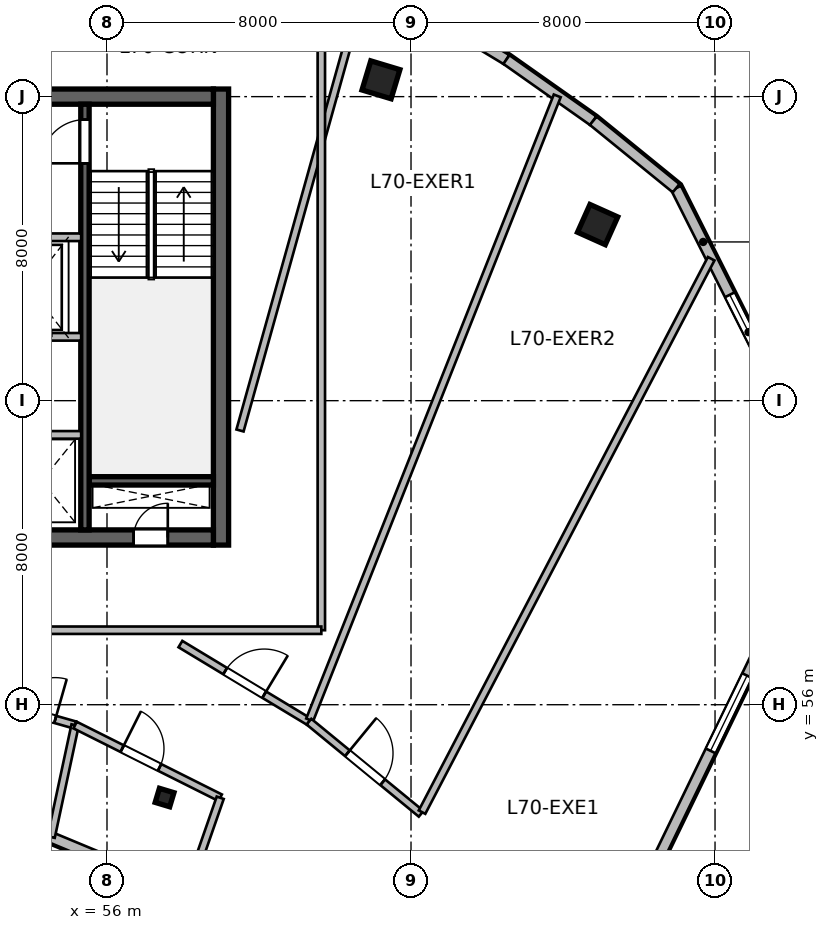
"""IFC4 building model, lengths in metres.
Left out: names, types, materials, properties, quantities, classifications, styles, units other than length and angle.
Written with IfcOpenShell. Run it as: python <this file> out.ifc"""

import sys

from ifc_helpers import new_model, si_unit, direction, frame, frame_2d, origin, origin_2d, place, context, subcontext, project, spatial, rectangle, i_section, extrude, source, transform, mapped, element, fill, save


model = new_model("IFC4")
c1 = context("Model", 3, precision=1e-05, world=origin(), true_north=direction((0.0, 1.0)))
c2 = subcontext(c1, "Body", "Model", "MODEL_VIEW")
j1 = project(units=[si_unit("LENGTHUNIT", "METRE"), si_unit("PLANEANGLEUNIT", "RADIAN")], contexts=[c1])
p1 = place(None, origin())
s1 = spatial("IfcSite", under=j1, at=p1, CompositionType="ELEMENT")
p2 = place(p1, origin())
s2 = spatial("IfcBuilding", under=s1, at=p2, CompositionType="ELEMENT")
p3 = place(p2, frame((0.0, 0.0, 287.4)))
s3 = spatial("IfcBuildingStorey", under=s2, at=p3, CompositionType="ELEMENT", Elevation=287.4)
m1 = source(origin(), c2, "Body", "SweptSolid", [
    extrude(rectangle(XDim=12.0, YDim=0.4, at=frame_2d((6.0, 0.0))), origin(), (0.0, 0.0, 1.0), 3.9),
])
p4 = place(p3, frame((59.0, 60.2, 0.0), z_axis=(0.0, 0.0, 1.0), x_axis=(0.0, 1.0, 0.0)))
e1 = element("IfcWall", 1, at=p4, inside=s3, PredefinedType="SHEAR", context=c2, shape_type="MappedRepresentation", body=[
    mapped(m1, transform((0.0, 0.0, 0.0), scale=1.0)),
])
m2 = source(origin(), c2, "Body", "SweptSolid", [
    extrude(rectangle(XDim=21.6, YDim=0.4, at=frame_2d((10.8, 0.0))), origin(), (0.0, 0.0, 1.0), 3.9),
])
p5 = place(p3, frame((37.2, 60.4, 0.0), z_axis=(0.0, 0.0, 1.0), x_axis=(1.0, 0.0, 0.0)))
e2 = element("IfcWall", 2, at=p5, inside=s3, PredefinedType="SHEAR", context=c2, shape_type="MappedRepresentation", body=[
    mapped(m2, transform((0.0, 0.0, 0.0), scale=1.0)),
])
p6 = place(p5, frame((1.1, 0.0, 0.0)))
e3 = element("IfcOpeningElement", 3, at=p6, cuts=e2, PredefinedType="OPENING", context=c2, shape_type="SweptSolid", body=[
    extrude(rectangle(XDim=1.15, YDim=2.15, at=frame_2d((0.575, 1.075))), frame((0.0, 0.21, 0.0), z_axis=(0.0, -1.0, 0.0), x_axis=(1.0, 0.0, 0.0)), (0.0, 0.0, 1.0), 0.42),
])
p7 = place(p5, frame((19.5, 0.0, 0.0)))
e4 = element("IfcOpeningElement", 4, at=p7, cuts=e2, PredefinedType="OPENING", context=c2, shape_type="SweptSolid", body=[
    extrude(rectangle(XDim=0.9, YDim=2.1, at=frame_2d((0.45, 1.05))), frame((0.0, 0.21, 0.0), z_axis=(0.0, -1.0, 0.0), x_axis=(1.0, 0.0, 0.0)), (0.0, 0.0, 1.0), 0.42),
])
p8 = place(p5, frame((12.02, 0.0, 0.0)))
e5 = element("IfcOpeningElement", 5, at=p8, cuts=e2, PredefinedType="OPENING", context=c2, shape_type="SweptSolid", body=[
    extrude(rectangle(XDim=1.6, YDim=2.15, at=frame_2d((0.8, 1.075))), frame((0.0, 0.21, 0.0), z_axis=(0.0, -1.0, 0.0), x_axis=(1.0, 0.0, 0.0)), (0.0, 0.0, 1.0), 0.42),
])
p9 = place(p3, frame((37.2, 72.0, 0.0), z_axis=(0.0, 0.0, 1.0), x_axis=(1.0, 0.0, 0.0)))
e6 = element("IfcWall", 6, at=p9, inside=s3, PredefinedType="SHEAR", context=c2, shape_type="MappedRepresentation", body=[
    mapped(m2, transform((0.0, 0.0, 0.0), scale=1.0)),
])
p10 = place(p9, frame((1.2, 0.0, 0.0)))
e7 = element("IfcOpeningElement", 7, at=p10, cuts=e6, PredefinedType="OPENING", context=c2, shape_type="SweptSolid", body=[
    extrude(rectangle(XDim=0.9, YDim=2.1, at=frame_2d((0.45, 1.05))), frame((0.0, 0.21, 0.0), z_axis=(0.0, -1.0, 0.0), x_axis=(1.0, 0.0, 0.0)), (0.0, 0.0, 1.0), 0.42),
])
p11 = place(p9, frame((14.7, 0.0, 0.0)))
e8 = element("IfcOpeningElement", 8, at=p11, cuts=e6, PredefinedType="OPENING", context=c2, shape_type="SweptSolid", body=[
    extrude(rectangle(XDim=1.2, YDim=2.15, at=frame_2d((0.6, 1.075))), frame((0.0, 0.21, 0.0), z_axis=(0.0, -1.0, 0.0), x_axis=(1.0, 0.0, 0.0)), (0.0, 0.0, 1.0), 0.42),
])
p12 = place(p9, frame((4.15, 0.0, 0.0)))
e9 = element("IfcOpeningElement", 9, at=p12, cuts=e6, PredefinedType="OPENING", context=c2, shape_type="SweptSolid", body=[
    extrude(rectangle(XDim=1.3, YDim=2.15, at=frame_2d((0.65, 1.075))), frame((0.0, 0.21, 0.0), z_axis=(0.0, -1.0, 0.0), x_axis=(1.0, 0.0, 0.0)), (0.0, 0.0, 1.0), 0.42),
])
p13 = place(p9, frame((7.1, 0.0, 0.0)))
e10 = element("IfcOpeningElement", 10, at=p13, cuts=e6, PredefinedType="OPENING", context=c2, shape_type="SweptSolid", body=[
    extrude(rectangle(XDim=0.9, YDim=2.1, at=frame_2d((0.45, 1.05))), frame((0.0, 0.21, 0.0), z_axis=(0.0, -1.0, 0.0), x_axis=(1.0, 0.0, 0.0)), (0.0, 0.0, 1.0), 0.42),
])
m3 = source(origin(), c2, "Body", "SweptSolid", [
    extrude(rectangle(XDim=3.27, YDim=0.22, at=frame_2d((1.635, 0.0))), origin(), (0.0, 0.0, 1.0), 3.9),
])
p14 = place(p3, frame((55.53, 61.89, 0.0), z_axis=(0.0, 0.0, 1.0), x_axis=(1.0, 0.0, 0.0)))
e11 = element("IfcWall", 11, at=p14, inside=s3, PredefinedType="SHEAR", context=c2, shape_type="MappedRepresentation", body=[
    mapped(m3, transform((0.0, 0.0, 0.0), scale=1.0)),
])
m4 = source(origin(), c2, "Body", "SweptSolid", [
    extrude(rectangle(XDim=11.2, YDim=0.22, at=frame_2d((5.6, 0.0))), origin(), (0.0, 0.0, 1.0), 3.9),
])
p15 = place(p3, frame((55.42, 60.6, 0.0), z_axis=(0.0, 0.0, 1.0), x_axis=(0.0, 1.0, 0.0)))
e12 = element("IfcWall", 12, at=p15, inside=s3, PredefinedType="SHEAR", context=c2, shape_type="MappedRepresentation", body=[
    mapped(m4, transform((0.0, 0.0, 0.0), scale=1.0)),
])
p16 = place(p15, frame((9.645, 0.0, 0.0)))
e13 = element("IfcOpeningElement", 13, at=p16, cuts=e12, PredefinedType="OPENING", context=c2, shape_type="SweptSolid", body=[
    extrude(rectangle(XDim=1.15, YDim=2.15, at=frame_2d((0.575, 1.075))), frame((0.0, 0.12, 0.0), z_axis=(0.0, -1.0, 0.0), x_axis=(1.0, 0.0, 0.0)), (0.0, 0.0, 1.0), 0.24),
])
m5 = source(origin(), c2, "Body", "SweptSolid", [
    extrude(i_section(OverallWidth=0.399, OverallDepth=0.387, WebThickness=0.021, FlangeThickness=0.033, at=origin_2d()), origin(), (0.0, 0.0, 1.0), 3.9),
])
p17 = place(p3, frame((57.515, 53.558, 0.0), z_axis=(0.0, 0.0, 1.0), x_axis=(0.288697611798, 0.957420330337, 0.0)))
e14 = element("IfcColumn", 14, at=p17, inside=s3, PredefinedType="COLUMN", context=c2, shape_type="MappedRepresentation", body=[
    mapped(m5, transform((0.0, 0.0, 0.0), scale=1.0)),
])
m6 = source(origin(), c2, "Body", "SweptSolid", [
    extrude(rectangle(XDim=0.8, YDim=0.8, at=origin_2d()), origin(), (0.0, 0.0, 1.0), 3.9),
])
for number, where, z_axis, x_axis in (
    (15, (63.209, 72.442, 0.0), (0.0, 0.0, 1.0), (0.289, 0.957, 0.0)),
    (16, (68.91, 68.633, 0.0), (0.0, 0.0, 1.0), (0.409, 0.912, 0.0)),
):
    element("IfcColumn", number, at=place(p3, frame(where, z_axis=z_axis, x_axis=x_axis)), inside=s3, PredefinedType="COLUMN", context=c2, shape_type="MappedRepresentation", body=[
        mapped(m6, transform((0.0, 0.0, 0.0), scale=1.0)),
    ])
m7 = source(origin(), c2, "Body", "SweptSolid", [
    extrude(rectangle(XDim=5.653, YDim=0.28, at=frame_2d((2.827, 0.0))), origin(), (0.0, 0.0, 1.0), 3.64),
])
p18 = place(p3, frame((70.976, 69.591, 0.0), z_axis=(0.0, 0.0, 1.0), x_axis=(0.449302555419, -0.893379658205, 0.0)))
e17 = element("IfcWall", 17, at=p18, inside=s3, PredefinedType="SOLIDWALL", context=c2, shape_type="MappedRepresentation", body=[
    mapped(m7, transform((0.0, 0.0, 0.0), scale=1.0)),
])
p19 = place(p18, frame((3.14, 0.0, 0.95)))
e18 = element("IfcOpeningElement", 18, at=p19, cuts=e17, PredefinedType="OPENING", context=c2, shape_type="SweptSolid", body=[
    extrude(rectangle(XDim=2.2, YDim=2.1, at=frame_2d((1.1, 1.05))), frame((0.0, 0.15, 0.0), z_axis=(0.0, -1.0, 0.0), x_axis=(1.0, 0.0, 0.0)), (0.0, 0.0, 1.0), 0.3),
])
m8 = source(origin(), c2, "Body", "SweptSolid", [
    extrude(rectangle(XDim=7.211, YDim=0.28, at=frame_2d((3.606, 0.0))), origin(), (0.0, 0.0, 1.0), 3.64),
])
p20 = place(p3, frame((73.148, 57.399, 0.0), z_axis=(0.0, 0.0, 1.0), x_axis=(-0.436088263006, -0.899903898685, 0.0)))
e19 = element("IfcWall", 19, at=p20, inside=s3, PredefinedType="SOLIDWALL", context=c2, shape_type="MappedRepresentation", body=[
    mapped(m8, transform((0.0, 0.0, 0.0), scale=1.0)),
])
p21 = place(p20, frame((0.703, 0.0, 0.95)))
e20 = element("IfcOpeningElement", 20, at=p21, cuts=e19, PredefinedType="OPENING", context=c2, shape_type="SweptSolid", body=[
    extrude(rectangle(XDim=2.2, YDim=2.1, at=frame_2d((1.1, 1.05))), frame((0.0, 0.15, 0.0), z_axis=(0.0, -1.0, 0.0), x_axis=(1.0, 0.0, 0.0)), (0.0, 0.0, 1.0), 0.3),
])
m9 = source(origin(), c2, "Body", "SweptSolid", [
    extrude(rectangle(XDim=1.488, YDim=0.28, at=frame_2d((0.744, 0.0))), origin(), (0.0, 0.0, 1.0), 3.64),
])
p22 = place(p3, frame((55.736, 52.004, 0.0), z_axis=(0.0, 0.0, 1.0), x_axis=(-0.923261314935, 0.384172545017, 0.0)))
e21 = element("IfcWall", 21, at=p22, inside=s3, PredefinedType="SOLIDWALL", context=c2, shape_type="MappedRepresentation", body=[
    mapped(m9, transform((0.0, 0.0, 0.0), scale=1.0)),
])
m10 = source(origin(), c2, "Body", "SweptSolid", [
    extrude(rectangle(XDim=2.748, YDim=0.28, at=frame_2d((1.374, 0.0))), origin(), (0.0, 0.0, 1.0), 3.64),
])
p23 = place(p3, frame((64.157, 74.396, 0.0), z_axis=(0.0, 0.0, 1.0), x_axis=(0.856149718453, -0.516727838996, 0.0)))
e22 = element("IfcWall", 22, at=p23, inside=s3, PredefinedType="SOLIDWALL", context=c2, shape_type="MappedRepresentation", body=[
    mapped(m10, transform((0.0, 0.0, 0.0), scale=1.0)),
])
m11 = source(origin(), c2, "Body", "SweptSolid", [
    extrude(rectangle(XDim=2.795, YDim=0.28, at=frame_2d((1.397, 0.0))), origin(), (0.0, 0.0, 1.0), 3.64),
])
p24 = place(p3, frame((66.51, 72.975, 0.0), z_axis=(0.0, 0.0, 1.0), x_axis=(0.817265517835, -0.576261289136, 0.0)))
e23 = element("IfcWall", 23, at=p24, inside=s3, PredefinedType="SOLIDWALL", context=c2, shape_type="MappedRepresentation", body=[
    mapped(m11, transform((0.0, 0.0, 0.0), scale=1.0)),
])
m12 = source(origin(), c2, "Body", "SweptSolid", [
    extrude(rectangle(XDim=2.812, YDim=0.28, at=frame_2d((1.406, 0.0))), origin(), (0.0, 0.0, 1.0), 3.64),
])
p25 = place(p3, frame((68.795, 71.365, 0.0), z_axis=(0.0, 0.0, 1.0), x_axis=(0.775880230716, -0.630880232361, 0.0)))
e24 = element("IfcWall", 24, at=p25, inside=s3, PredefinedType="SOLIDWALL", context=c2, shape_type="MappedRepresentation", body=[
    mapped(m12, transform((0.0, 0.0, 0.0), scale=1.0)),
])
m13 = source(origin(), c2, "Body", "SweptSolid", [
    extrude(rectangle(XDim=5.62, YDim=0.2, at=frame_2d((2.81, 0.0))), origin(), (0.0, 0.0, 1.0), 3.64),
])
p26 = place(p3, frame((49.7, 68.3, 0.0), z_axis=(0.0, 0.0, 1.0), x_axis=(1.0, 0.0, 0.0)))
e25 = element("IfcWall", 25, at=p26, inside=s3, PredefinedType="SOLIDWALL", context=c2, shape_type="MappedRepresentation", body=[
    mapped(m13, transform((0.0, 0.0, 0.0), scale=1.0)),
])
p27 = place(p26, frame((1.6, 0.0, 0.0)))
e26 = element("IfcOpeningElement", 26, at=p27, cuts=e25, PredefinedType="OPENING", context=c2, shape_type="SweptSolid", body=[
    extrude(rectangle(XDim=1.1, YDim=2.15, at=frame_2d((0.55, 1.075))), frame((0.0, 0.11, 0.0), z_axis=(0.0, -1.0, 0.0), x_axis=(1.0, 0.0, 0.0)), (0.0, 0.0, 1.0), 0.22),
])
p28 = place(p26, frame((3.7, 0.0, 0.0)))
e27 = element("IfcOpeningElement", 27, at=p28, cuts=e25, PredefinedType="OPENING", context=c2, shape_type="SweptSolid", body=[
    extrude(rectangle(XDim=1.1, YDim=2.15, at=frame_2d((0.55, 1.075))), frame((0.0, 0.11, 0.0), z_axis=(0.0, -1.0, 0.0), x_axis=(1.0, 0.0, 0.0)), (0.0, 0.0, 1.0), 0.22),
])
p29 = place(p3, frame((49.7, 65.68, 0.0), z_axis=(0.0, 0.0, 1.0), x_axis=(1.0, 0.0, 0.0)))
e28 = element("IfcWall", 28, at=p29, inside=s3, PredefinedType="SOLIDWALL", context=c2, shape_type="MappedRepresentation", body=[
    mapped(m13, transform((0.0, 0.0, 0.0), scale=1.0)),
])
m14 = source(origin(), c2, "Body", "SweptSolid", [
    extrude(rectangle(XDim=4.1, YDim=0.2, at=frame_2d((2.05, 0.0))), origin(), (0.0, 0.0, 1.0), 3.64),
])
p30 = place(p3, frame((51.22, 63.1, 0.0), z_axis=(0.0, 0.0, 1.0), x_axis=(1.0, 0.0, 0.0)))
e29 = element("IfcWall", 29, at=p30, inside=s3, PredefinedType="SOLIDWALL", context=c2, shape_type="MappedRepresentation", body=[
    mapped(m14, transform((0.0, 0.0, 0.0), scale=1.0)),
])
m15 = source(origin(), c2, "Body", "SweptSolid", [
    extrude(rectangle(XDim=3.687, YDim=0.195, at=frame_2d((1.843, 0.0))), origin(), (0.0, 0.0, 1.0), 3.64),
])
p31 = place(p3, frame((51.616, 56.474, 0.0), z_axis=(0.0, 0.0, 1.0), x_axis=(0.961753532248, -0.27391630694, 0.0)))
e30 = element("IfcWall", 30, at=p31, inside=s3, PredefinedType="PARTITIONING", context=c2, shape_type="MappedRepresentation", body=[
    mapped(m15, transform((0.0, 0.0, 0.0), scale=1.0)),
])
p32 = place(p31, frame((2.043, 0.0, 0.0)))
e31 = element("IfcOpeningElement", 31, at=p32, cuts=e30, PredefinedType="OPENING", context=c2, shape_type="SweptSolid", body=[
    extrude(rectangle(XDim=1.1, YDim=2.15, at=frame_2d((0.55, 1.075))), frame((0.0, 0.107, 0.0), z_axis=(0.0, -1.0, 0.0), x_axis=(1.0, 0.0, 0.0)), (0.0, 0.0, 1.0), 0.215),
])
m16 = source(origin(), c2, "Body", "SweptSolid", [
    extrude(rectangle(XDim=3.015, YDim=0.195, at=frame_2d((1.507, 0.0))), origin(), (0.0, 0.0, 1.0), 3.64),
])
p33 = place(p3, frame((54.53, 52.517, 0.0), z_axis=(0.0, 0.0, 1.0), x_axis=(0.209258086484, 0.977860446711, 0.0)))
e32 = element("IfcWall", 32, at=p33, inside=s3, PredefinedType="PARTITIONING", context=c2, shape_type="MappedRepresentation", body=[
    mapped(m16, transform((0.0, 0.0, 0.0), scale=1.0)),
])
m17 = source(origin(), c2, "Body", "SweptSolid", [
    extrude(rectangle(XDim=4.271, YDim=0.195, at=frame_2d((2.135, 0.0))), origin(), (0.0, 0.0, 1.0), 3.64),
])
p34 = place(p3, frame((55.161, 55.465, 0.0), z_axis=(0.0, 0.0, 1.0), x_axis=(0.894061035522, -0.447945158207, 0.0)))
e33 = element("IfcWall", 33, at=p34, inside=s3, PredefinedType="PARTITIONING", context=c2, shape_type="MappedRepresentation", body=[
    mapped(m17, transform((0.0, 0.0, 0.0), scale=1.0)),
])
p35 = place(p34, frame((1.385, 0.0, 0.0)))
e34 = element("IfcOpeningElement", 34, at=p35, cuts=e33, PredefinedType="OPENING", context=c2, shape_type="SweptSolid", body=[
    extrude(rectangle(XDim=1.1, YDim=2.15, at=frame_2d((0.55, 1.075))), frame((0.0, 0.107, 0.0), z_axis=(0.0, -1.0, 0.0), x_axis=(1.0, 0.0, 0.0)), (0.0, 0.0, 1.0), 0.215),
])
m18 = source(origin(), c2, "Body", "SweptSolid", [
    extrude(rectangle(XDim=2.942, YDim=0.195, at=frame_2d((1.471, 0.0))), origin(), (0.0, 0.0, 1.0), 3.64),
])
p36 = place(p3, frame((58.013, 50.773, 0.0), z_axis=(0.0, 0.0, 1.0), x_axis=(0.328623620494, 0.944460965871, 0.0)))
e35 = element("IfcWall", 35, at=p36, inside=s3, PredefinedType="PARTITIONING", context=c2, shape_type="MappedRepresentation", body=[
    mapped(m18, transform((0.0, 0.0, 0.0), scale=1.0)),
])
m19 = source(origin(), c2, "Body", "SweptSolid", [
    extrude(rectangle(XDim=3.951, YDim=0.195, at=frame_2d((1.975, 0.0))), origin(), (0.0, 0.0, 1.0), 3.64),
])
p37 = place(p3, frame((57.932, 57.596, 0.0), z_axis=(0.0, 0.0, 1.0), x_axis=(0.856137696849, -0.51674775668, 0.0)))
e36 = element("IfcWall", 36, at=p37, inside=s3, PredefinedType="PARTITIONING", context=c2, shape_type="MappedRepresentation", body=[
    mapped(m19, transform((0.0, 0.0, 0.0), scale=1.0)),
])
p38 = place(p37, frame((1.375, 0.0, 0.0)))
e37 = element("IfcOpeningElement", 37, at=p38, cuts=e36, PredefinedType="OPENING", context=c2, shape_type="SweptSolid", body=[
    extrude(rectangle(XDim=1.2, YDim=2.15, at=frame_2d((0.6, 1.075))), frame((0.0, 0.107, 0.0), z_axis=(0.0, -1.0, 0.0), x_axis=(1.0, 0.0, 0.0)), (0.0, 0.0, 1.0), 0.215),
])
m20 = source(origin(), c2, "Body", "SweptSolid", [
    extrude(rectangle(XDim=12.307, YDim=0.195, at=frame_2d((6.153, 0.0))), origin(), (0.0, 0.0, 1.0), 3.64),
])
p39 = place(p3, frame((59.5, 63.216, 0.0), z_axis=(0.0, 0.0, 1.0), x_axis=(0.268768150257, 0.96320490105, 0.0)))
e38 = element("IfcWall", 38, at=p39, inside=s3, PredefinedType="PARTITIONING", context=c2, shape_type="MappedRepresentation", body=[
    mapped(m20, transform((0.0, 0.0, 0.0), scale=1.0)),
])
m21 = source(origin(), c2, "Body", "SweptSolid", [
    extrude(rectangle(XDim=17.664, YDim=0.195, at=frame_2d((8.832, 0.0))), origin(), (0.0, 0.0, 1.0), 3.64),
])
p40 = place(p3, frame((61.333, 55.602, 0.0), z_axis=(0.0, 0.0, 1.0), x_axis=(0.368827513738, 0.929497856431, 0.0)))
e39 = element("IfcWall", 39, at=p40, inside=s3, PredefinedType="PARTITIONING", context=c2, shape_type="MappedRepresentation", body=[
    mapped(m21, transform((0.0, 0.0, 0.0), scale=1.0)),
])
m22 = source(origin(), c2, "Body", "SweptSolid", [
    extrude(rectangle(XDim=3.82, YDim=0.195, at=frame_2d((1.91, 0.0))), origin(), (0.0, 0.0, 1.0), 3.64),
])
p41 = place(p3, frame((61.314, 55.554, 0.0), z_axis=(0.0, 0.0, 1.0), x_axis=(0.772805728445, -0.63464266015, 0.0)))
e40 = element("IfcWall", 40, at=p41, inside=s3, PredefinedType="PARTITIONING", context=c2, shape_type="MappedRepresentation", body=[
    mapped(m22, transform((0.0, 0.0, 0.0), scale=1.0)),
])
p42 = place(p41, frame((1.31, 0.0, 0.0)))
e41 = element("IfcOpeningElement", 41, at=p42, cuts=e40, PredefinedType="OPENING", context=c2, shape_type="SweptSolid", body=[
    extrude(rectangle(XDim=1.2, YDim=2.15, at=frame_2d((0.6, 1.075))), frame((0.0, 0.107, 0.0), z_axis=(0.0, -1.0, 0.0), x_axis=(1.0, 0.0, 0.0)), (0.0, 0.0, 1.0), 0.215),
])
m23 = source(origin(), c2, "Body", "SweptSolid", [
    extrude(rectangle(XDim=16.43, YDim=0.195, at=frame_2d((8.215, 0.0))), origin(), (0.0, 0.0, 1.0), 3.64),
])
p43 = place(p3, frame((64.29, 53.174, 0.0), z_axis=(0.0, 0.0, 1.0), x_axis=(0.463119459371, 0.886295868405, 0.0)))
e42 = element("IfcWall", 42, at=p43, inside=s3, PredefinedType="PARTITIONING", context=c2, shape_type="MappedRepresentation", body=[
    mapped(m23, transform((0.0, 0.0, 0.0), scale=1.0)),
])
m24 = source(origin(), c2, "Body", "SweptSolid", [
    extrude(rectangle(XDim=17.693, YDim=0.195, at=frame_2d((8.847, 0.0))), origin(), (0.0, 0.0, 1.0), 3.64),
])
p44 = place(p3, frame((61.64, 57.96, 0.0), z_axis=(0.0, 0.0, 1.0), x_axis=(0.0, 1.0, 0.0)))
e43 = element("IfcWall", 43, at=p44, inside=s3, PredefinedType="PARTITIONING", context=c2, shape_type="MappedRepresentation", body=[
    mapped(m24, transform((0.0, 0.0, 0.0), scale=1.0)),
])
m25 = source(origin(), c2, "Body", "SweptSolid", [
    extrude(rectangle(XDim=12.39, YDim=0.195, at=frame_2d((6.195, 0.0))), origin(), (0.0, 0.0, 1.0), 3.64),
])
p45 = place(p3, frame((49.25, 57.96, 0.0), z_axis=(0.0, 0.0, 1.0), x_axis=(1.0, 0.0, 0.0)))
e44 = element("IfcWall", 44, at=p45, inside=s3, PredefinedType="PARTITIONING", context=c2, shape_type="MappedRepresentation", body=[
    mapped(m25, transform((0.0, 0.0, 0.0), scale=1.0)),
])
m26 = source(origin(), c2, "Body", "SweptSolid", [
    extrude(rectangle(XDim=2.2, YDim=2.1, at=frame_2d((1.1, 1.05))), frame((0.0, 0.03, 0.0), z_axis=(0.0, -1.0, 0.0), x_axis=(1.0, 0.0, 0.0)), (0.0, 0.0, 1.0), 0.06),
])
p46 = place(p19, origin())
e45 = element("IfcWindow", 45, at=p46, inside=s3, PartitioningType="TRIPLE_PANEL_VERTICAL", PredefinedType="WINDOW", context=c2, shape_type="MappedRepresentation", body=[
    mapped(m26, transform((0.0, 0.0, 0.0), scale=1.0)),
])
fill(e18, e45)
p47 = place(p21, origin())
e46 = element("IfcWindow", 46, at=p47, inside=s3, PartitioningType="TRIPLE_PANEL_VERTICAL", PredefinedType="WINDOW", context=c2, shape_type="MappedRepresentation", body=[
    mapped(m26, transform((0.0, 0.0, 0.0), scale=1.0)),
])
fill(e20, e46)
m27 = source(origin(), c2, "Body", "SweptSolid", [
    extrude(rectangle(XDim=0.9, YDim=2.1, at=frame_2d((0.45, 1.05))), frame((0.0, 0.025, 0.0), z_axis=(0.0, -1.0, 0.0), x_axis=(1.0, 0.0, 0.0)), (0.0, 0.0, 1.0), 0.05),
])
p48 = place(p7, origin())
e47 = element("IfcDoor", 47, at=p48, inside=s3, OperationType="SINGLE_SWING_RIGHT", PredefinedType="DOOR", context=c2, shape_type="MappedRepresentation", body=[
    mapped(m27, transform((0.0, 0.0, 0.0), scale=1.0)),
])
fill(e4, e47)
m28 = source(origin(), c2, "Body", "SweptSolid", [
    extrude(rectangle(XDim=1.15, YDim=2.15, at=frame_2d((0.575, 1.075))), frame((0.0, 0.025, 0.0), z_axis=(0.0, -1.0, 0.0), x_axis=(1.0, 0.0, 0.0)), (0.0, 0.0, 1.0), 0.05),
])
p49 = place(p16, origin())
e48 = element("IfcDoor", 48, at=p49, inside=s3, OperationType="SINGLE_SWING_LEFT", PredefinedType="DOOR", context=c2, shape_type="MappedRepresentation", body=[
    mapped(m28, transform((0.0, 0.0, 0.0), scale=1.0)),
])
fill(e13, e48)
m29 = source(origin(), c2, "Body", "SweptSolid", [
    extrude(rectangle(XDim=1.1, YDim=2.15, at=frame_2d((0.55, 1.075))), frame((0.0, 0.025, 0.0), z_axis=(0.0, -1.0, 0.0), x_axis=(1.0, 0.0, 0.0)), (0.0, 0.0, 1.0), 0.05),
])
p50 = place(p32, origin())
e49 = element("IfcDoor", 49, at=p50, inside=s3, OperationType="SINGLE_SWING_RIGHT", PredefinedType="DOOR", context=c2, shape_type="MappedRepresentation", body=[
    mapped(m29, transform((0.0, 0.0, 0.0), scale=1.0)),
])
fill(e31, e49)
p51 = place(p35, origin())
e50 = element("IfcDoor", 50, at=p51, inside=s3, OperationType="SINGLE_SWING_LEFT", PredefinedType="DOOR", context=c2, shape_type="MappedRepresentation", body=[
    mapped(m29, transform((0.0, 0.0, 0.0), scale=1.0)),
])
fill(e34, e50)
m30 = source(origin(), c2, "Body", "SweptSolid", [
    extrude(rectangle(XDim=1.2, YDim=2.15, at=frame_2d((0.6, 1.075))), frame((0.0, 0.025, 0.0), z_axis=(0.0, -1.0, 0.0), x_axis=(1.0, 0.0, 0.0)), (0.0, 0.0, 1.0), 0.05),
])
p52 = place(p38, origin())
e51 = element("IfcDoor", 51, at=p52, inside=s3, OperationType="SINGLE_SWING_RIGHT", PredefinedType="DOOR", context=c2, shape_type="MappedRepresentation", body=[
    mapped(m30, transform((0.0, 0.0, 0.0), scale=1.0)),
])
fill(e37, e51)
p53 = place(p42, origin())
e52 = element("IfcDoor", 52, at=p53, inside=s3, OperationType="SINGLE_SWING_LEFT", PredefinedType="DOOR", context=c2, shape_type="MappedRepresentation", body=[
    mapped(m30, transform((0.0, 0.0, 0.0), scale=1.0)),
])
fill(e41, e52)
save(model, sys.argv[1])
